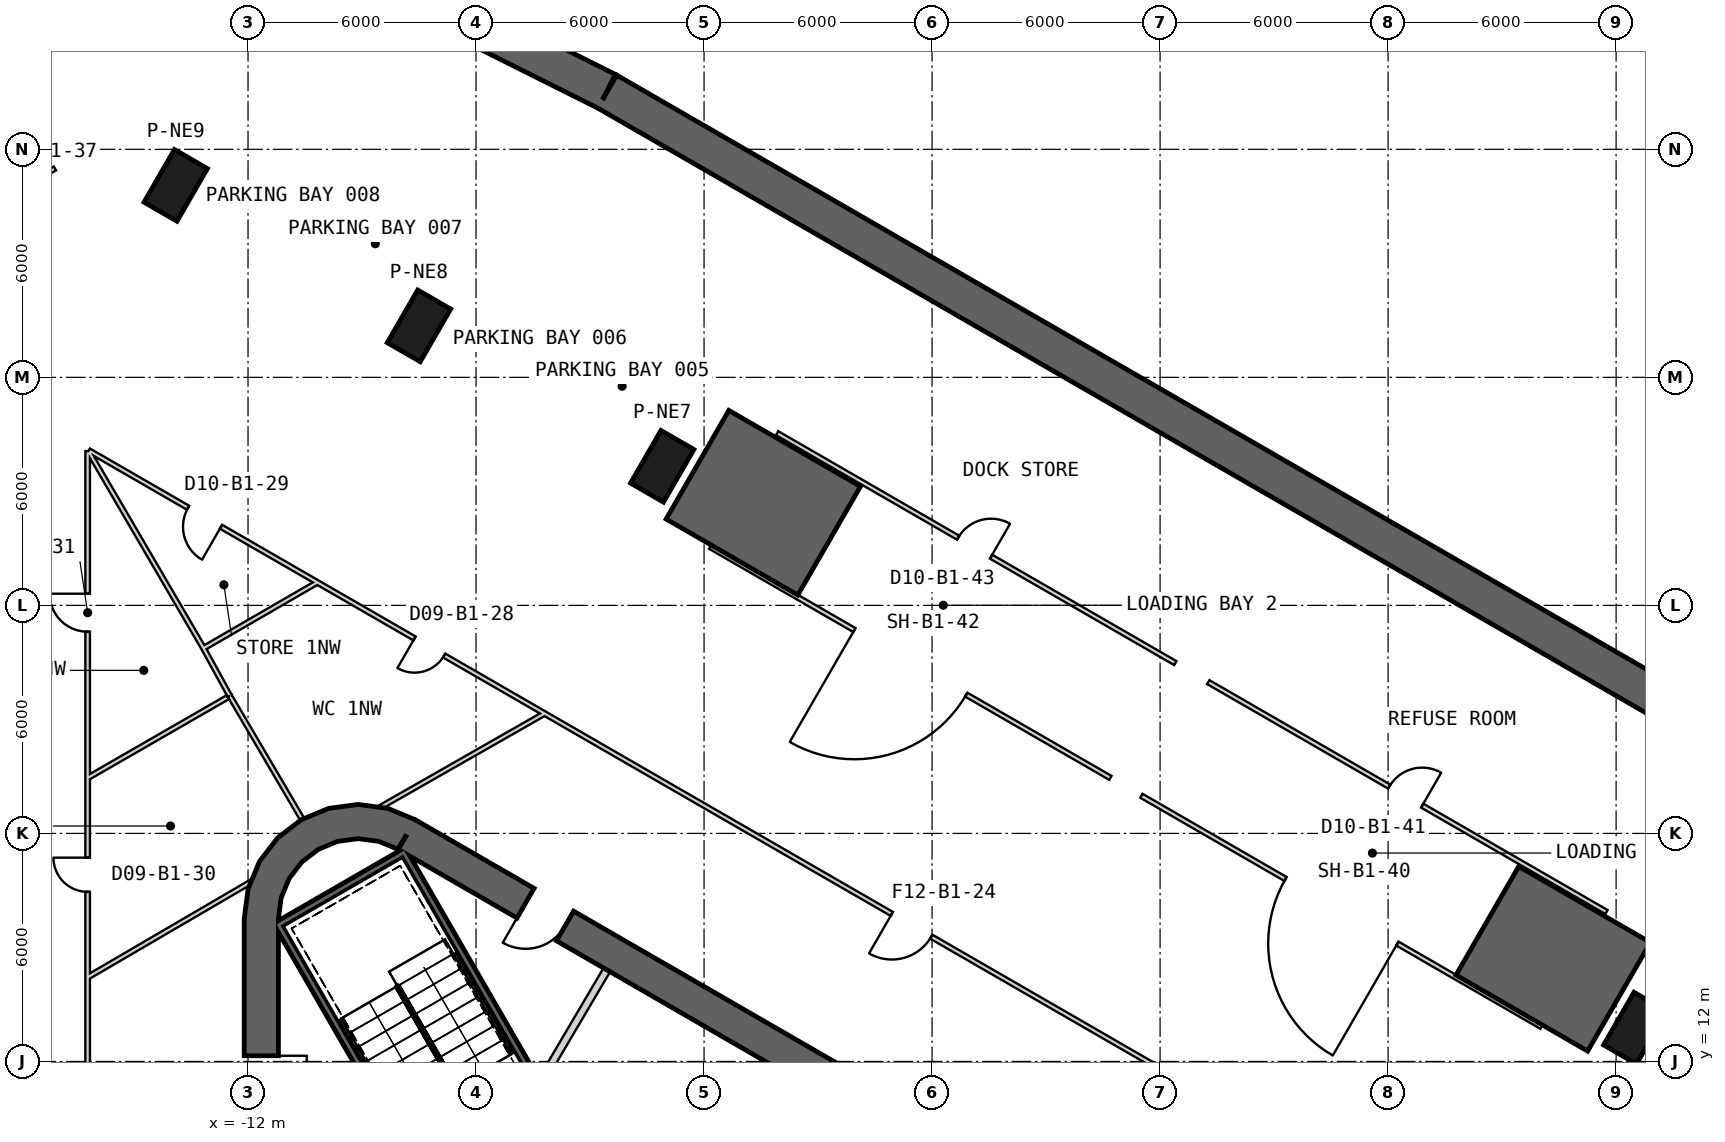
"""IFC4 building model, lengths in metres.
Left out: names, types, materials, properties, quantities, classifications, styles, units other than length and angle.
Written with IfcOpenShell. Run it as: python <this file> out.ifc"""

import sys

from ifc_helpers import new_model, si_unit, direction, frame, frame_2d, origin, origin_2d, place, context, subcontext, project, spatial, polyline, rectangle, outline, extrude, element, fill, save


model = new_model("IFC4")
c1 = context("Model", 3, precision=1e-05, world=origin(), true_north=direction((0.0, 1.0)))
c2 = subcontext(c1, "Body", "Model", "MODEL_VIEW")
j1 = project(units=[si_unit("LENGTHUNIT", "METRE"), si_unit("PLANEANGLEUNIT", "RADIAN")], contexts=[c1])
p1 = place(None, origin())
s1 = spatial("IfcSite", under=j1, at=p1, CompositionType="ELEMENT")
p2 = place(p1, origin())
s2 = spatial("IfcBuilding", under=s1, at=p2, CompositionType="ELEMENT")
p3 = place(p2, frame((0.0, 0.0, -5.5)))
s3 = spatial("IfcBuildingStorey", under=s2, at=p3, CompositionType="ELEMENT", Elevation=-5.5)
p4 = place(p3, frame((-14.881, 43.691, 0.0), z_axis=(0.0, 0.0, 1.0), x_axis=(0.894257014389, -0.447553786954, 0.0)))
e1 = element("IfcWall", 1, at=p4, inside=s3, PredefinedType="SHEAR", context=c2, shape_type="SweptSolid", body=[
    extrude(rectangle(XDim=13.778, YDim=1.0, at=frame_2d((6.889, 0.0))), origin(), (0.0, 0.0, 1.0), 5.5),
])
p5 = place(p3, frame((-2.547, 37.518, 0.0), z_axis=(0.0, 0.0, 1.0), x_axis=(0.866165180358, -0.499757821684, 0.0)))
e2 = element("IfcWall", 2, at=p5, inside=s3, PredefinedType="SHEAR", context=c2, shape_type="SweptSolid", body=[
    extrude(rectangle(XDim=41.631, YDim=1.0, at=frame_2d((20.815, 0.0))), origin(), (0.0, 0.0, 1.0), 5.5),
])
for number, where, z_axis, x_axis in (
    (3, (24.504, 12.876, 0.0), (0.0, 0.0, 1.0), (0.5, 0.866, 0.0)),
    (4, (-1.101, 27.659, 0.0), (0.0, 0.0, 1.0), (0.5, 0.866, 0.0)),
    (5, (-7.502, 31.355, 0.0), (0.0, 0.0, 1.0), (0.5, 0.866, 0.0)),
    (6, (-13.903, 35.051, 0.0), (0.0, 0.0, 1.0), (0.5, 0.866, 0.0)),
):
    element("IfcColumn", number, at=place(p3, frame(where, z_axis=z_axis, x_axis=x_axis)), inside=s3, PredefinedType="COLUMN", context=c2, shape_type="SweptSolid", body=[
        extrude(rectangle(XDim=1.6, YDim=1.0, at=origin_2d()), origin(), (0.0, 0.0, 1.0), 5.5),
    ])
p6 = place(p3, frame((19.475, 2.208, 0.0), z_axis=(0.0, 0.0, 1.0), x_axis=(-0.866028369851, 0.499994862586, 0.0)))
e7 = element("IfcWall", 7, at=p6, inside=s3, PredefinedType="SHEAR", context=c2, shape_type="SweptSolid", body=[
    extrude(rectangle(XDim=31.523, YDim=0.9, at=frame_2d((15.762, 0.0))), origin(), (0.0, 0.0, 1.0), 5.5),
])
p7 = place(p6, frame((3.612, 0.0, 0.0)))
e8 = element("IfcOpeningElement", 8, at=p7, cuts=e7, PredefinedType="OPENING", context=c2, shape_type="SweptSolid", body=[
    extrude(rectangle(XDim=1.2, YDim=2.4, at=frame_2d((0.6, 1.2))), frame((0.0, 0.46, 0.0), z_axis=(0.0, -1.0, 0.0), x_axis=(1.0, 0.0, 0.0)), (0.0, 0.0, 1.0), 0.92),
])
p8 = place(p6, frame((26.712, 0.0, 0.0)))
e9 = element("IfcOpeningElement", 9, at=p8, cuts=e7, PredefinedType="OPENING", context=c2, shape_type="SweptSolid", body=[
    extrude(rectangle(XDim=1.2, YDim=2.4, at=frame_2d((0.6, 1.2))), frame((0.0, 0.46, 0.0), z_axis=(0.0, -1.0, 0.0), x_axis=(1.0, 0.0, 0.0)), (0.0, 0.0, 1.0), 0.92),
])
p9 = place(p3, frame((-11.65, 15.762, 0.0), z_axis=(0.0, 0.0, 1.0), x_axis=(0.0, -1.0, 0.0)))
e10 = element("IfcWall", 10, at=p9, inside=s3, PredefinedType="SHEAR", context=c2, shape_type="SweptSolid", body=[
    extrude(rectangle(XDim=31.523, YDim=0.9, at=frame_2d((15.762, 0.0))), origin(), (0.0, 0.0, 1.0), 5.5),
])
p10 = place(p9, frame((3.612, 0.0, 0.0)))
e11 = element("IfcOpeningElement", 11, at=p10, cuts=e10, PredefinedType="OPENING", context=c2, shape_type="SweptSolid", body=[
    extrude(rectangle(XDim=1.2, YDim=2.4, at=frame_2d((0.6, 1.2))), frame((0.0, 0.46, 0.0), z_axis=(0.0, -1.0, 0.0), x_axis=(1.0, 0.0, 0.0)), (0.0, 0.0, 1.0), 0.92),
])
p11 = place(p9, frame((26.712, 0.0, 0.0)))
e12 = element("IfcOpeningElement", 12, at=p11, cuts=e10, PredefinedType="OPENING", context=c2, shape_type="SweptSolid", body=[
    extrude(rectangle(XDim=1.2, YDim=2.4, at=frame_2d((0.6, 1.2))), frame((0.0, 0.46, 0.0), z_axis=(0.0, -1.0, 0.0), x_axis=(1.0, 0.0, 0.0)), (0.0, 0.0, 1.0), 0.92),
])
p12 = place(p3, origin())
e13 = element("IfcWall", 13, at=p12, inside=s3, PredefinedType="SHEAR", context=c2, shape_type="SweptSolid", body=[
    extrude(outline(polyline([(-7.6, 18.36), (-8.323, 18.659), (-9.1, 18.762), (-9.876, 18.659), (-10.6, 18.36), (-11.221, 17.883), (-11.698, 17.262), (-11.998, 16.538), (-12.1, 15.762), (-11.2, 15.762), (-11.128, 16.305), (-10.919, 16.812), (-10.585, 17.247), (-10.15, 17.58), (-9.644, 17.79), (-9.1, 17.862), (-8.556, 17.79), (-8.05, 17.58), (-7.6, 18.36)])), origin(), (0.0, 0.0, 1.0), 5.5),
])
p13 = place(p3, origin())
e14 = element("IfcWall", 14, at=p13, inside=s3, PredefinedType="SHEAR", context=c2, shape_type="SweptSolid", body=[
    extrude(outline(polyline([(24.901, 15.13), (21.437, 17.13), (19.787, 14.272), (23.251, 12.272), (24.901, 15.13)])), origin(), (0.0, 0.0, 1.0), 5.5),
])
p14 = place(p3, origin())
e15 = element("IfcWall", 15, at=p14, inside=s3, PredefinedType="SHEAR", context=c2, shape_type="SweptSolid", body=[
    extrude(outline(polyline([(4.116, 27.13), (0.652, 29.13), (-0.998, 26.272), (2.467, 24.272), (4.116, 27.13)])), origin(), (0.0, 0.0, 1.0), 5.5),
])
p15 = place(p3, frame((-11.245, 15.678, -0.4), z_axis=(0.0, 0.0, 1.0), x_axis=(0.499977274689, -0.866038523851, 0.0)))
e16 = element("IfcWall", 16, at=p15, inside=s3, PredefinedType="SHEAR", context=c2, shape_type="SweptSolid", body=[
    extrude(rectangle(XDim=8.1, YDim=0.2, at=frame_2d((4.05, 0.0))), origin(), (0.0, 0.0, 1.0), 5.5),
])
p16 = place(p3, frame((-7.818, 17.541, -0.4), z_axis=(0.0, 0.0, 1.0), x_axis=(-0.866044365799, -0.499967155389, 0.0)))
e17 = element("IfcWall", 17, at=p16, inside=s3, PredefinedType="SHEAR", context=c2, shape_type="SweptSolid", body=[
    extrude(rectangle(XDim=3.8, YDim=0.2, at=frame_2d((1.9, 0.0))), origin(), (0.0, 0.0, 1.0), 5.5),
])
p17 = place(p3, frame((-7.854, 17.405, -0.4), z_axis=(0.0, 0.0, 1.0), x_axis=(0.499997992926, -0.866026562566, 0.0)))
e18 = element("IfcWall", 18, at=p17, inside=s3, PredefinedType="SHEAR", context=c2, shape_type="SweptSolid", body=[
    extrude(rectangle(XDim=7.9, YDim=0.2, at=frame_2d((3.95, 0.0))), origin(), (0.0, 0.0, 1.0), 5.5),
])
p18 = place(p3, frame((-2.558, 14.409, 0.0), z_axis=(0.0, 0.0, 1.0), x_axis=(-0.508018930956, -0.861345903683, 0.0)))
e19 = element("IfcWall", 19, at=p18, inside=s3, PredefinedType="PARTITIONING", context=c2, shape_type="SweptSolid", body=[
    extrude(rectangle(XDim=3.15, YDim=0.2, at=frame_2d((1.575, 0.0))), origin(), (0.0, 0.0, 1.0), 5.1),
])
p19 = place(p3, frame((32.38, 0.046, 0.0), z_axis=(0.0, 0.0, 1.0), x_axis=(-0.86611360534, 0.499847199298, 0.0)))
e20 = element("IfcWall", 20, at=p19, inside=s3, PredefinedType="PARTITIONING", context=c2, shape_type="SweptSolid", body=[
    extrude(rectangle(XDim=56.078, YDim=0.12, at=frame_2d((28.039, 0.0))), origin(), (0.0, 0.0, 1.0), 4.07),
])
p20 = place(p19, frame((30.481, 0.0, 0.0)))
e21 = element("IfcOpeningElement", 21, at=p20, cuts=e20, PredefinedType="OPENING", context=c2, shape_type="SweptSolid", body=[
    extrude(rectangle(XDim=1.2, YDim=2.4, at=frame_2d((0.6, 1.2))), frame((0.0, 0.07, 0.0), z_axis=(0.0, -1.0, 0.0), x_axis=(1.0, 0.0, 0.0)), (0.0, 0.0, 1.0), 0.14),
])
p21 = place(p19, frame((10.481, 0.0, 0.0)))
e22 = element("IfcOpeningElement", 22, at=p21, cuts=e20, PredefinedType="OPENING", context=c2, shape_type="SweptSolid", body=[
    extrude(rectangle(XDim=1.2, YDim=2.4, at=frame_2d((0.6, 1.2))), frame((0.0, 0.07, 0.0), z_axis=(0.0, -1.0, 0.0), x_axis=(1.0, 0.0, 0.0)), (0.0, 0.0, 1.0), 0.14),
])
p22 = place(p19, frame((45.282, 0.0, 0.0)))
e23 = element("IfcOpeningElement", 23, at=p22, cuts=e20, PredefinedType="OPENING", context=c2, shape_type="SweptSolid", body=[
    extrude(rectangle(XDim=0.9, YDim=2.1, at=frame_2d((0.45, 1.05))), frame((0.0, 0.07, 0.0), z_axis=(0.0, -1.0, 0.0), x_axis=(1.0, 0.0, 0.0)), (0.0, 0.0, 1.0), 0.14),
])
p23 = place(p19, frame((52.061, 0.0, 0.0)))
e24 = element("IfcOpeningElement", 24, at=p23, cuts=e20, PredefinedType="OPENING", context=c2, shape_type="SweptSolid", body=[
    extrude(rectangle(XDim=1.0, YDim=2.1, at=frame_2d((0.5, 1.05))), frame((0.0, 0.07, 0.0), z_axis=(0.0, -1.0, 0.0), x_axis=(1.0, 0.0, 0.0)), (0.0, 0.0, 1.0), 0.14),
])
p24 = place(p3, frame((-16.22, -20.053, 0.0), z_axis=(0.0, 0.0, 1.0), x_axis=(0.0, 1.0, 0.0)))
e25 = element("IfcWall", 25, at=p24, inside=s3, PredefinedType="PARTITIONING", context=c2, shape_type="SweptSolid", body=[
    extrude(rectangle(XDim=48.113, YDim=0.12, at=frame_2d((24.056, 0.0))), origin(), (0.0, 0.0, 1.0), 4.07),
])
p25 = place(p24, frame((12.991, 0.0, 0.0)))
e26 = element("IfcOpeningElement", 26, at=p25, cuts=e25, PredefinedType="OPENING", context=c2, shape_type="SweptSolid", body=[
    extrude(rectangle(XDim=1.2, YDim=2.4, at=frame_2d((0.6, 1.2))), frame((0.0, 0.07, 0.0), z_axis=(0.0, -1.0, 0.0), x_axis=(1.0, 0.0, 0.0)), (0.0, 0.0, 1.0), 0.14),
])
p26 = place(p24, frame((25.991, 0.0, 0.0)))
e27 = element("IfcOpeningElement", 27, at=p26, cuts=e25, PredefinedType="OPENING", context=c2, shape_type="SweptSolid", body=[
    extrude(rectangle(XDim=1.2, YDim=2.4, at=frame_2d((0.6, 1.2))), frame((0.0, 0.07, 0.0), z_axis=(0.0, -1.0, 0.0), x_axis=(1.0, 0.0, 0.0)), (0.0, 0.0, 1.0), 0.14),
])
p27 = place(p24, frame((36.515, 0.0, 0.0)))
e28 = element("IfcOpeningElement", 28, at=p27, cuts=e25, PredefinedType="OPENING", context=c2, shape_type="SweptSolid", body=[
    extrude(rectangle(XDim=0.9, YDim=2.1, at=frame_2d((0.45, 1.05))), frame((0.0, 0.07, 0.0), z_axis=(0.0, -1.0, 0.0), x_axis=(1.0, 0.0, 0.0)), (0.0, 0.0, 1.0), 0.14),
])
p28 = place(p24, frame((43.361, 0.0, 0.0)))
e29 = element("IfcOpeningElement", 29, at=p28, cuts=e25, PredefinedType="OPENING", context=c2, shape_type="SweptSolid", body=[
    extrude(rectangle(XDim=1.0, YDim=2.1, at=frame_2d((0.5, 1.05))), frame((0.0, 0.07, 0.0), z_axis=(0.0, -1.0, 0.0), x_axis=(1.0, 0.0, 0.0)), (0.0, 0.0, 1.0), 0.14),
])
p29 = place(p24, frame((2.394, 0.0, 0.0)))
e30 = element("IfcOpeningElement", 30, at=p29, cuts=e25, PredefinedType="OPENING", context=c2, shape_type="SweptSolid", body=[
    extrude(rectangle(XDim=1.0, YDim=2.1, at=frame_2d((0.5, 1.05))), frame((0.0, 0.07, 0.0), z_axis=(0.0, -1.0, 0.0), x_axis=(1.0, 0.0, 0.0)), (0.0, 0.0, 1.0), 0.14),
])
p30 = place(p3, frame((-17.081, 35.496, 0.0), z_axis=(0.0, 0.0, 1.0), x_axis=(-0.866020498397, -0.500008496284, 0.0)))
e31 = element("IfcWall", 31, at=p30, inside=s3, PredefinedType="PARTITIONING", context=c2, shape_type="SweptSolid", body=[
    extrude(rectangle(XDim=5.911, YDim=0.12, at=frame_2d((2.955, 0.0))), origin(), (0.0, 0.0, 1.0), 4.07),
])
p31 = place(p30, frame((0.383, 0.0, 0.0)))
e32 = element("IfcOpeningElement", 32, at=p31, cuts=e31, PredefinedType="OPENING", context=c2, shape_type="SweptSolid", body=[
    extrude(rectangle(XDim=1.0, YDim=2.1, at=frame_2d((0.5, 1.05))), frame((0.0, 0.07, 0.0), z_axis=(0.0, -1.0, 0.0), x_axis=(1.0, 0.0, 0.0)), (0.0, 0.0, 1.0), 0.14),
])
p32 = place(p3, frame((22.038, 12.911, 0.0), z_axis=(0.0, 0.0, 1.0), x_axis=(-0.866020417952, 0.500008635616, 0.0)))
e33 = element("IfcWall", 33, at=p32, inside=s3, PredefinedType="PARTITIONING", context=c2, shape_type="SweptSolid", body=[
    extrude(rectangle(XDim=12.16, YDim=0.12, at=frame_2d((6.08, 0.0))), origin(), (0.0, 0.0, 1.0), 5.1),
])
p33 = place(p32, frame((4.38, 0.0, 0.0)))
e34 = element("IfcOpeningElement", 34, at=p33, cuts=e33, PredefinedType="OPENING", context=c2, shape_type="SweptSolid", body=[
    extrude(rectangle(XDim=3.4, YDim=4.0, at=frame_2d((1.7, 2.0))), frame((0.0, 0.07, 0.0), z_axis=(0.0, -1.0, 0.0), x_axis=(1.0, 0.0, 0.0)), (0.0, 0.0, 1.0), 0.14),
])
p34 = place(p3, frame((10.693, 19.461, 0.0), z_axis=(0.0, 0.0, 1.0), x_axis=(-0.866020417952, 0.500008635616, 0.0)))
e35 = element("IfcWall", 35, at=p34, inside=s3, PredefinedType="PARTITIONING", context=c2, shape_type="SweptSolid", body=[
    extrude(rectangle(XDim=12.16, YDim=0.12, at=frame_2d((6.08, 0.0))), origin(), (0.0, 0.0, 1.0), 5.1),
])
p35 = place(p34, frame((4.38, 0.0, 0.0)))
e36 = element("IfcOpeningElement", 36, at=p35, cuts=e35, PredefinedType="OPENING", context=c2, shape_type="SweptSolid", body=[
    extrude(rectangle(XDim=3.4, YDim=4.0, at=frame_2d((1.7, 2.0))), frame((0.0, 0.07, 0.0), z_axis=(0.0, -1.0, 0.0), x_axis=(1.0, 0.0, 0.0)), (0.0, 0.0, 1.0), 0.14),
])
p36 = place(p3, frame((-4.22, 21.143, 0.0), z_axis=(0.0, 0.0, 1.0), x_axis=(-0.868530929613, -0.495634970825, 0.0)))
e37 = element("IfcWall", 37, at=p36, inside=s3, PredefinedType="PARTITIONING", context=c2, shape_type="SweptSolid", body=[
    extrude(rectangle(XDim=5.166, YDim=0.12, at=frame_2d((2.583, 0.0))), origin(), (0.0, 0.0, 1.0), 4.18),
])
p37 = place(p3, frame((-11.74, 16.832, 0.0), z_axis=(0.0, 0.0, 1.0), x_axis=(-0.863501067027, -0.504347010741, 0.0)))
e38 = element("IfcWall", 38, at=p37, inside=s3, PredefinedType="PARTITIONING", context=c2, shape_type="SweptSolid", body=[
    extrude(rectangle(XDim=5.166, YDim=0.12, at=frame_2d((2.583, 0.0))), origin(), (0.0, 0.0, 1.0), 4.18),
])
p38 = place(p3, frame((-10.197, 24.594, 0.0), z_axis=(0.0, 0.0, 1.0), x_axis=(-0.865437539194, -0.501016831807, 0.0)))
e39 = element("IfcWall", 39, at=p38, inside=s3, PredefinedType="PARTITIONING", context=c2, shape_type="SweptSolid", body=[
    extrude(rectangle(XDim=3.466, YDim=0.12, at=frame_2d((1.733, 0.0))), origin(), (0.0, 0.0, 1.0), 4.07),
])
p39 = place(p3, frame((-12.479, 21.615, 0.0), z_axis=(0.0, 0.0, 1.0), x_axis=(0.506545569598, -0.862213190528, 0.0)))
e40 = element("IfcWall", 40, at=p39, inside=s3, PredefinedType="PARTITIONING", context=c2, shape_type="SweptSolid", body=[
    extrude(rectangle(XDim=3.913, YDim=0.12, at=frame_2d((1.956, 0.0))), origin(), (0.0, 0.0, 1.0), 4.07),
])
p40 = place(p3, frame((-13.186, 22.898, 0.0), z_axis=(0.0, 0.0, 1.0), x_axis=(0.482129852101, -0.876099769269, 0.0)))
e41 = element("IfcWall", 41, at=p40, inside=s3, PredefinedType="PARTITIONING", context=c2, shape_type="SweptSolid", body=[
    extrude(rectangle(XDim=1.465, YDim=0.12, at=frame_2d((0.732, 0.0))), origin(), (0.0, 0.0, 1.0), 4.07),
])
p41 = place(p3, frame((-13.186, 22.898, 0.0), z_axis=(0.0, 0.0, 1.0), x_axis=(-0.504338258722, 0.863506178779, 0.0)))
e42 = element("IfcWall", 42, at=p41, inside=s3, PredefinedType="PARTITIONING", context=c2, shape_type="SweptSolid", body=[
    extrude(rectangle(XDim=5.977, YDim=0.12, at=frame_2d((2.989, 0.0))), origin(), (0.0, 0.0, 1.0), 4.07),
])
p42 = place(p3, frame((-12.531, 21.585, 0.0), z_axis=(0.0, 0.0, 1.0), x_axis=(-0.866495491634, -0.499184898588, 0.0)))
e43 = element("IfcWall", 43, at=p42, inside=s3, PredefinedType="PARTITIONING", context=c2, shape_type="SweptSolid", body=[
    extrude(rectangle(XDim=4.234, YDim=0.12, at=frame_2d((2.117, 0.0))), origin(), (0.0, 0.0, 1.0), 4.07),
])
p43 = place(p3, frame((1.923, 28.531, 0.0), z_axis=(0.0, 0.0, 1.0), x_axis=(0.866034387366, -0.499984439657, 0.0)))
e44 = element("IfcWall", 44, at=p43, inside=s3, PredefinedType="PARTITIONING", context=c2, shape_type="SweptSolid", body=[
    extrude(rectangle(XDim=12.1, YDim=0.12, at=frame_2d((6.05, 0.0))), origin(), (0.0, 0.0, 1.0), 5.1),
])
p44 = place(p43, frame((5.5, 0.0, 0.0)))
e45 = element("IfcOpeningElement", 45, at=p44, cuts=e44, PredefinedType="OPENING", context=c2, shape_type="SweptSolid", body=[
    extrude(rectangle(XDim=1.0, YDim=2.1, at=frame_2d((0.5, 1.05))), frame((0.0, 0.07, 0.0), z_axis=(0.0, -1.0, 0.0), x_axis=(1.0, 0.0, 0.0)), (0.0, 0.0, 1.0), 0.14),
])
p45 = place(p3, frame((13.268, 21.981, 0.0), z_axis=(0.0, 0.0, 1.0), x_axis=(0.866020606328, -0.500008309346, 0.0)))
e46 = element("IfcWall", 46, at=p45, inside=s3, PredefinedType="PARTITIONING", context=c2, shape_type="SweptSolid", body=[
    extrude(rectangle(XDim=12.1, YDim=0.12, at=frame_2d((6.05, 0.0))), origin(), (0.0, 0.0, 1.0), 5.1),
])
p46 = place(p45, frame((5.5, 0.0, 0.0)))
e47 = element("IfcOpeningElement", 47, at=p46, cuts=e46, PredefinedType="OPENING", context=c2, shape_type="SweptSolid", body=[
    extrude(rectangle(XDim=1.0, YDim=2.1, at=frame_2d((0.5, 1.05))), frame((0.0, 0.07, 0.0), z_axis=(0.0, -1.0, 0.0), x_axis=(1.0, 0.0, 0.0)), (0.0, 0.0, 1.0), 0.14),
])
p47 = place(p20, origin())
e48 = element("IfcDoor", 48, at=p47, inside=s3, OperationType="SINGLE_SWING_RIGHT", PredefinedType="USERDEFINED", context=c2, shape_type="SweptSolid", body=[
    extrude(rectangle(XDim=1.2, YDim=2.4, at=frame_2d((0.6, 1.2))), frame((0.0, 0.025, 0.0), z_axis=(0.0, -1.0, 0.0), x_axis=(1.0, 0.0, 0.0)), (0.0, 0.0, 1.0), 0.05),
])
fill(e21, e48)
p48 = place(p22, origin())
e49 = element("IfcDoor", 49, at=p48, inside=s3, OperationType="SINGLE_SWING_RIGHT", PredefinedType="NOTDEFINED", context=c2, shape_type="SweptSolid", body=[
    extrude(rectangle(XDim=0.9, YDim=2.1, at=frame_2d((0.45, 1.05))), frame((0.0, 0.025, 0.0), z_axis=(0.0, -1.0, 0.0), x_axis=(1.0, 0.0, 0.0)), (0.0, 0.0, 1.0), 0.05),
])
fill(e23, e49)
p49 = place(p23, origin())
e50 = element("IfcDoor", 50, at=p49, inside=s3, OperationType="SINGLE_SWING_LEFT", PredefinedType="NOTDEFINED", context=c2, shape_type="SweptSolid", body=[
    extrude(rectangle(XDim=1.0, YDim=2.1, at=frame_2d((0.5, 1.05))), frame((0.0, 0.025, 0.0), z_axis=(0.0, -1.0, 0.0), x_axis=(1.0, 0.0, 0.0)), (0.0, 0.0, 1.0), 0.05),
])
fill(e24, e50)
p50 = place(p27, origin())
e51 = element("IfcDoor", 51, at=p50, inside=s3, OperationType="SINGLE_SWING_RIGHT", PredefinedType="NOTDEFINED", context=c2, shape_type="SweptSolid", body=[
    extrude(rectangle(XDim=0.9, YDim=2.1, at=frame_2d((0.45, 1.05))), frame((0.0, 0.025, 0.0), z_axis=(0.0, -1.0, 0.0), x_axis=(1.0, 0.0, 0.0)), (0.0, 0.0, 1.0), 0.05),
])
fill(e28, e51)
p51 = place(p28, origin())
e52 = element("IfcDoor", 52, at=p51, inside=s3, OperationType="SINGLE_SWING_RIGHT", PredefinedType="NOTDEFINED", context=c2, shape_type="SweptSolid", body=[
    extrude(rectangle(XDim=1.0, YDim=2.1, at=frame_2d((0.5, 1.05))), frame((0.0, 0.025, 0.0), z_axis=(0.0, -1.0, 0.0), x_axis=(1.0, 0.0, 0.0)), (0.0, 0.0, 1.0), 0.05),
])
fill(e29, e52)
p52 = place(p33, origin())
e53 = element("IfcDoor", 53, at=p52, inside=s3, OperationType="SINGLE_SWING_LEFT", PredefinedType="NOTDEFINED", context=c2, shape_type="SweptSolid", body=[
    extrude(rectangle(XDim=3.4, YDim=4.0, at=frame_2d((1.7, 2.0))), frame((0.0, 0.025, 0.0), z_axis=(0.0, -1.0, 0.0), x_axis=(1.0, 0.0, 0.0)), (0.0, 0.0, 1.0), 0.05),
])
fill(e34, e53)
p53 = place(p46, origin())
e54 = element("IfcDoor", 54, at=p53, inside=s3, OperationType="SINGLE_SWING_RIGHT", PredefinedType="NOTDEFINED", context=c2, shape_type="SweptSolid", body=[
    extrude(rectangle(XDim=1.0, YDim=2.1, at=frame_2d((0.5, 1.05))), frame((0.0, 0.025, 0.0), z_axis=(0.0, -1.0, 0.0), x_axis=(1.0, 0.0, 0.0)), (0.0, 0.0, 1.0), 0.05),
])
fill(e47, e54)
p54 = place(p35, origin())
e55 = element("IfcDoor", 55, at=p54, inside=s3, OperationType="SINGLE_SWING_RIGHT", PredefinedType="NOTDEFINED", context=c2, shape_type="SweptSolid", body=[
    extrude(rectangle(XDim=3.4, YDim=4.0, at=frame_2d((1.7, 2.0))), frame((0.0, 0.025, 0.0), z_axis=(0.0, -1.0, 0.0), x_axis=(1.0, 0.0, 0.0)), (0.0, 0.0, 1.0), 0.05),
])
fill(e36, e55)
p55 = place(p44, origin())
e56 = element("IfcDoor", 56, at=p55, inside=s3, OperationType="SINGLE_SWING_RIGHT", PredefinedType="NOTDEFINED", context=c2, shape_type="SweptSolid", body=[
    extrude(rectangle(XDim=1.0, YDim=2.1, at=frame_2d((0.5, 1.05))), frame((0.0, 0.025, 0.0), z_axis=(0.0, -1.0, 0.0), x_axis=(1.0, 0.0, 0.0)), (0.0, 0.0, 1.0), 0.05),
])
fill(e45, e56)
p56 = place(p8, origin())
e57 = element("IfcDoor", 57, at=p56, inside=s3, OperationType="SINGLE_SWING_RIGHT", PredefinedType="USERDEFINED", context=c2, shape_type="SweptSolid", body=[
    extrude(rectangle(XDim=1.2, YDim=2.4, at=frame_2d((0.6, 1.2))), frame((0.0, 0.025, 0.0), z_axis=(0.0, -1.0, 0.0), x_axis=(1.0, 0.0, 0.0)), (0.0, 0.0, 1.0), 0.05),
])
fill(e9, e57)
p57 = place(p10, origin())
e58 = element("IfcDoor", 58, at=p57, inside=s3, OperationType="SINGLE_SWING_LEFT", PredefinedType="USERDEFINED", context=c2, shape_type="SweptSolid", body=[
    extrude(rectangle(XDim=1.2, YDim=2.4, at=frame_2d((0.6, 1.2))), frame((0.0, 0.025, 0.0), z_axis=(0.0, -1.0, 0.0), x_axis=(1.0, 0.0, 0.0)), (0.0, 0.0, 1.0), 0.05),
])
fill(e11, e58)
save(model, sys.argv[1])
